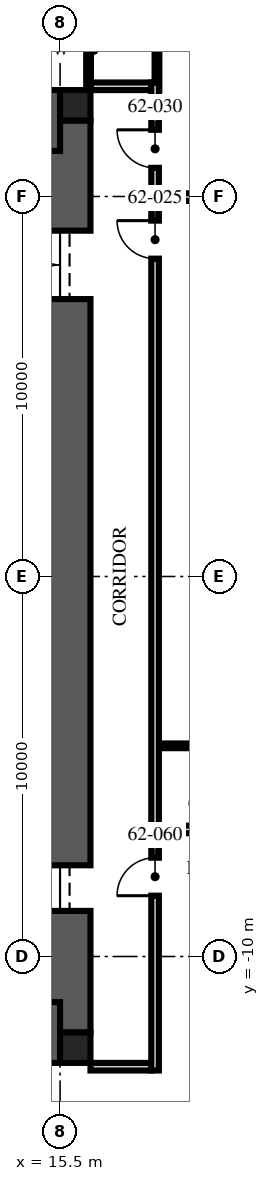
"""IFC4 building model, lengths in metres.
Left out: names, types, materials, properties, quantities, classifications, styles, units other than length and angle.
Written with IfcOpenShell. Run it as: python <this file> out.ifc"""

import sys

from ifc_helpers import new_model, si_unit, direction, frame, frame_2d, origin, origin_2d, place, context, subcontext, project, spatial, rectangle, extrude, element, fill, save


model = new_model("IFC4")
c1 = context("Model", 3, precision=1e-05, world=origin(), true_north=direction((0.0, 1.0)))
c2 = subcontext(c1, "Body", "Model", "MODEL_VIEW")
j1 = project(units=[si_unit("LENGTHUNIT", "METRE"), si_unit("PLANEANGLEUNIT", "RADIAN")], contexts=[c1])
p1 = place(None, origin())
s1 = spatial("IfcSite", under=j1, at=p1, CompositionType="ELEMENT")
p2 = place(p1, origin())
s2 = spatial("IfcBuilding", under=s1, at=p2, CompositionType="ELEMENT")
p3 = place(p2, frame((0.0, 0.0, 248.25)))
s3 = spatial("IfcBuildingStorey", under=s2, at=p3, CompositionType="ELEMENT", Elevation=248.25)
p4 = place(p3, frame((15.5, -12.0, -0.25), z_axis=(0.0, 0.0, 1.0), x_axis=(0.0, 1.0, 0.0)))
e1 = element("IfcWall", 1, at=p4, inside=s3, PredefinedType="SHEAR", context=c2, shape_type="SweptSolid", body=[
    extrude(rectangle(XDim=24.0, YDim=1.6, at=frame_2d((12.0, 0.0))), origin(), (0.0, 0.0, 1.0), 3.75),
])
p5 = place(p4, frame((3.2, 0.0, 0.25)))
e2 = element("IfcOpeningElement", 2, at=p5, cuts=e1, PredefinedType="OPENING", context=c2, shape_type="SweptSolid", body=[
    extrude(rectangle(XDim=1.2, YDim=2.1, at=frame_2d((0.6, 1.05))), frame((0.0, 0.81, 0.0), z_axis=(0.0, -1.0, 0.0), x_axis=(1.0, 0.0, 0.0)), (0.0, 0.0, 1.0), 1.62),
])
p6 = place(p4, frame((19.3, 0.0, 0.25)))
e3 = element("IfcOpeningElement", 3, at=p6, cuts=e1, PredefinedType="OPENING", context=c2, shape_type="SweptSolid", body=[
    extrude(rectangle(XDim=1.8, YDim=2.1, at=frame_2d((0.9, 1.05))), frame((0.0, 0.81, 0.0), z_axis=(0.0, -1.0, 0.0), x_axis=(1.0, 0.0, 0.0)), (0.0, 0.0, 1.0), 1.62),
])
for number, where, z_axis, x_axis in (
    (4, (-15.5, 12.0, -0.25), (0.0, 0.0, 1.0), (1.0, 0.0, 0.0)),
    (5, (-15.5, -12.0, -0.25), (0.0, 0.0, 1.0), (1.0, 0.0, 0.0)),
):
    element("IfcWall", number, at=place(p3, frame(where, z_axis=z_axis, x_axis=x_axis)), inside=s3, PredefinedType="SHEAR", context=c2, shape_type="SweptSolid", body=[
        extrude(rectangle(XDim=31.0, YDim=1.6, at=frame_2d((15.5, 0.0))), origin(), (0.0, 0.0, 1.0), 3.75),
    ])
for number, where, z_axis, x_axis in (
    (6, (15.9, 12.4, -0.25), (0.0, 0.0, 1.0), (1.0, 0.0, 0.0)),
    (7, (15.9, -12.4, -0.25), (0.0, 0.0, 1.0), (1.0, 0.0, 0.0)),
):
    element("IfcColumn", number, at=place(p3, frame(where, z_axis=z_axis, x_axis=x_axis)), inside=s3, PredefinedType="COLUMN", context=c2, shape_type="SweptSolid", body=[
        extrude(rectangle(XDim=0.8, YDim=0.8, at=origin_2d()), origin(), (0.0, 0.0, 1.0), 3.75),
    ])
for number, where, z_axis, x_axis in (
    (8, (16.3, 12.9, 0.0), (0.0, 0.0, 1.0), (1.0, 0.0, 0.0)),
    (9, (16.3, -12.9, 0.0), (0.0, 0.0, 1.0), (1.0, 0.0, 0.0)),
):
    element("IfcWall", number, at=place(p3, frame(where, z_axis=z_axis, x_axis=x_axis)), inside=s3, PredefinedType="PARTITIONING", context=c2, shape_type="SweptSolid", body=[
        extrude(rectangle(XDim=1.6, YDim=0.2, at=frame_2d((0.8, 0.0))), origin(), (0.0, 0.0, 1.0), 2.3),
    ])
for number, where, z_axis, x_axis in (
    (10, (18.1, -6.656, 0.0), (0.0, 0.0, 1.0), (1.0, 0.0, 0.0)),
    (11, (18.1, 9.984, 0.0), (0.0, 0.0, 1.0), (1.0, 0.0, 0.0)),
):
    element("IfcWall", number, at=place(p3, frame(where, z_axis=z_axis, x_axis=x_axis)), inside=s3, PredefinedType="PARTITIONING", context=c2, shape_type="SweptSolid", body=[
        extrude(rectangle(XDim=7.6, YDim=0.2, at=frame_2d((3.8, 0.0))), origin(), (0.0, 0.0, 1.0), 2.91),
    ])
p7 = place(p3, frame((18.1, -4.456, 0.0), z_axis=(0.0, 0.0, 1.0), x_axis=(1.0, 0.0, 0.0)))
e12 = element("IfcWall", 12, at=p7, inside=s3, PredefinedType="PARTITIONING", context=c2, shape_type="SweptSolid", body=[
    extrude(rectangle(XDim=1.7, YDim=0.125, at=frame_2d((0.85, 0.0))), origin(), (0.0, 0.0, 1.0), 3.5),
])
for number, where, z_axis, x_axis in (
    (13, (18.05, 12.8, 0.0), (0.0, 0.0, 1.0), (0.0, 1.0, 0.0)),
    (14, (16.25, 12.8, 0.0), (0.0, 0.0, 1.0), (0.0, 1.0, 0.0)),
):
    element("IfcWall", number, at=place(p3, frame(where, z_axis=z_axis, x_axis=x_axis)), inside=s3, PredefinedType="PARTITIONING", context=c2, shape_type="SweptSolid", body=[
        extrude(rectangle(XDim=2.8, YDim=0.125, at=frame_2d((1.4, 0.0))), origin(), (0.0, 0.0, 1.0), 2.3),
    ])
p8 = place(p3, frame((18.0, -13.0, 0.0), z_axis=(0.0, 0.0, 1.0), x_axis=(0.0, 1.0, 0.0)))
e15 = element("IfcWall", 15, at=p8, inside=s3, PredefinedType="PARTITIONING", context=c2, shape_type="SweptSolid", body=[
    extrude(rectangle(XDim=26.0, YDim=0.2, at=frame_2d((13.0, 0.0))), origin(), (0.0, 0.0, 1.0), 2.6),
])
p9 = place(p8, frame((21.364, 0.0, 0.0)))
e16 = element("IfcOpeningElement", 16, at=p9, cuts=e15, PredefinedType="OPENING", context=c2, shape_type="SweptSolid", body=[
    extrude(rectangle(XDim=1.0, YDim=2.2, at=frame_2d((0.5, 1.1))), frame((0.0, 0.11, 0.0), z_axis=(0.0, -1.0, 0.0), x_axis=(1.0, 0.0, 0.0)), (0.0, 0.0, 1.0), 0.22),
])
p10 = place(p8, frame((23.754, 0.0, 0.0)))
e17 = element("IfcOpeningElement", 17, at=p10, cuts=e15, PredefinedType="OPENING", context=c2, shape_type="SweptSolid", body=[
    extrude(rectangle(XDim=1.0, YDim=2.2, at=frame_2d((0.5, 1.1))), frame((0.0, 0.11, 0.0), z_axis=(0.0, -1.0, 0.0), x_axis=(1.0, 0.0, 0.0)), (0.0, 0.0, 1.0), 0.22),
])
p11 = place(p8, frame((4.6, 0.0, 0.0)))
e18 = element("IfcOpeningElement", 18, at=p11, cuts=e15, PredefinedType="OPENING", context=c2, shape_type="SweptSolid", body=[
    extrude(rectangle(XDim=1.0, YDim=2.2, at=frame_2d((0.5, 1.1))), frame((0.0, 0.11, 0.0), z_axis=(0.0, -1.0, 0.0), x_axis=(1.0, 0.0, 0.0)), (0.0, 0.0, 1.0), 0.22),
])
p12 = place(p5, origin())
e19 = element("IfcDoor", 19, at=p12, inside=s3, OperationType="SINGLE_SWING_LEFT", PredefinedType="DOOR", context=c2, shape_type="SweptSolid", body=[
    extrude(rectangle(XDim=1.2, YDim=2.1, at=frame_2d((0.6, 1.05))), frame((0.0, 0.025, 0.0), z_axis=(0.0, -1.0, 0.0), x_axis=(1.0, 0.0, 0.0)), (0.0, 0.0, 1.0), 0.05),
])
fill(e2, e19)
p13 = place(p6, origin())
e20 = element("IfcDoor", 20, at=p13, inside=s3, OperationType="DOUBLE_DOOR_SINGLE_SWING", PredefinedType="DOOR", context=c2, shape_type="SweptSolid", body=[
    extrude(rectangle(XDim=1.8, YDim=2.1, at=frame_2d((0.9, 1.05))), frame((0.0, 0.025, 0.0), z_axis=(0.0, -1.0, 0.0), x_axis=(1.0, 0.0, 0.0)), (0.0, 0.0, 1.0), 0.05),
])
fill(e3, e20)
p14 = place(p9, origin())
e21 = element("IfcDoor", 21, at=p14, inside=s3, OperationType="SINGLE_SWING_RIGHT", PredefinedType="DOOR", context=c2, shape_type="SweptSolid", body=[
    extrude(rectangle(XDim=1.0, YDim=2.2, at=frame_2d((0.5, 1.1))), frame((0.0, 0.025, 0.0), z_axis=(0.0, -1.0, 0.0), x_axis=(1.0, 0.0, 0.0)), (0.0, 0.0, 1.0), 0.05),
])
fill(e16, e21)
p15 = place(p10, origin())
e22 = element("IfcDoor", 22, at=p15, inside=s3, OperationType="SINGLE_SWING_RIGHT", PredefinedType="DOOR", context=c2, shape_type="SweptSolid", body=[
    extrude(rectangle(XDim=1.0, YDim=2.2, at=frame_2d((0.5, 1.1))), frame((0.0, 0.025, 0.0), z_axis=(0.0, -1.0, 0.0), x_axis=(1.0, 0.0, 0.0)), (0.0, 0.0, 1.0), 0.05),
])
fill(e17, e22)
p16 = place(p11, origin())
e23 = element("IfcDoor", 23, at=p16, inside=s3, OperationType="SINGLE_SWING_LEFT", PredefinedType="DOOR", context=c2, shape_type="SweptSolid", body=[
    extrude(rectangle(XDim=1.0, YDim=2.2, at=frame_2d((0.5, 1.1))), frame((0.0, 0.025, 0.0), z_axis=(0.0, -1.0, 0.0), x_axis=(1.0, 0.0, 0.0)), (0.0, 0.0, 1.0), 0.05),
])
fill(e18, e23)
save(model, sys.argv[1])
